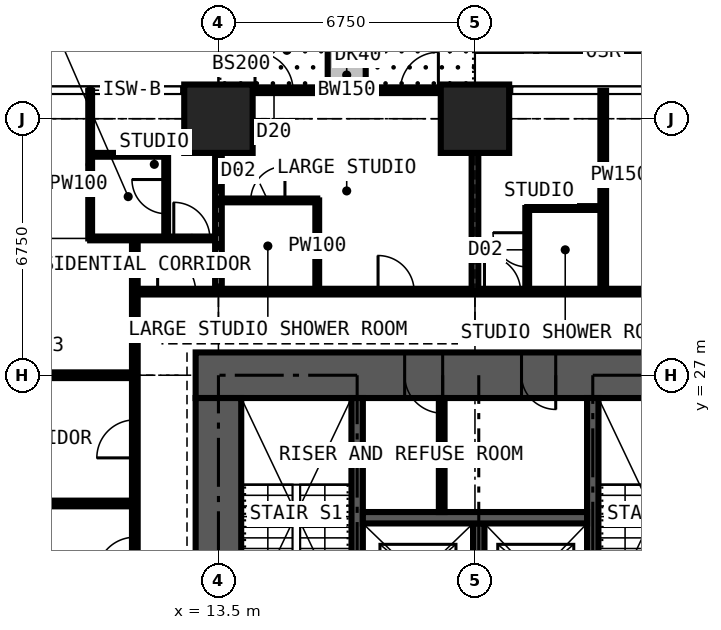
"""IFC4 building model, lengths in metres.
Left out: names, types, materials, properties, quantities, classifications, styles, units other than length and angle.
Written with IfcOpenShell. Run it as: python <this file> out.ifc"""

import sys

from ifc_helpers import new_model, si_unit, direction, frame, frame_2d, origin, origin_2d, place, context, subcontext, project, spatial, rectangle, extrude, element, fill, save


model = new_model("IFC4")
c1 = context("Model", 3, precision=1e-05, world=origin(), true_north=direction((0.0, 1.0)))
c2 = subcontext(c1, "Body", "Model", "MODEL_VIEW")
j1 = project(units=[si_unit("LENGTHUNIT", "METRE"), si_unit("PLANEANGLEUNIT", "RADIAN")], contexts=[c1])
p1 = place(None, origin())
s1 = spatial("IfcSite", under=j1, at=p1, CompositionType="ELEMENT")
p2 = place(p1, origin())
s2 = spatial("IfcBuilding", under=s1, at=p2, CompositionType="ELEMENT")
p3 = place(p2, frame((0.0, 0.0, 94.5)))
s3 = spatial("IfcBuildingStorey", under=s2, at=p3, CompositionType="ELEMENT", Elevation=94.5)
for number, where, z_axis, x_axis in (
    (1, (13.5, 33.75, 0.0), (0.0, 0.0, 1.0), (1.0, 0.0, 0.0)),
    (2, (20.25, 33.75, 0.0), (0.0, 0.0, 1.0), (1.0, 0.0, 0.0)),
):
    element("IfcColumn", number, at=place(p3, frame(where, z_axis=z_axis, x_axis=x_axis)), inside=s3, PredefinedType="COLUMN", context=c2, shape_type="SweptSolid", body=[
        extrude(rectangle(XDim=1.8, YDim=1.8, at=origin_2d()), origin(), (0.0, 0.0, 1.0), 3.6),
    ])
p4 = place(p3, frame((27.6, 27.0, 0.0), z_axis=(0.0, 0.0, 1.0), x_axis=(-1.0, 0.0, 0.0)))
e3 = element("IfcWall", 3, at=p4, inside=s3, PredefinedType="SHEAR", context=c2, shape_type="SweptSolid", body=[
    extrude(rectangle(XDim=14.7, YDim=1.2, at=frame_2d((7.35, 0.0))), origin(), (0.0, 0.0, 1.0), 3.6),
])
p5 = place(p4, frame((5.225, 0.0, 0.0)))
e4 = element("IfcOpeningElement", 4, at=p5, cuts=e3, PredefinedType="OPENING", context=c2, shape_type="SweptSolid", body=[
    extrude(rectangle(XDim=0.9, YDim=2.2, at=frame_2d((0.45, 1.1))), frame((0.0, 0.61, 0.0), z_axis=(0.0, -1.0, 0.0), x_axis=(1.0, 0.0, 0.0)), (0.0, 0.0, 1.0), 1.22),
])
p6 = place(p4, frame((8.2, 0.0, 0.0)))
e5 = element("IfcOpeningElement", 5, at=p6, cuts=e3, PredefinedType="OPENING", context=c2, shape_type="SweptSolid", body=[
    extrude(rectangle(XDim=1.0, YDim=2.2, at=frame_2d((0.5, 1.1))), frame((0.0, 0.61, 0.0), z_axis=(0.0, -1.0, 0.0), x_axis=(1.0, 0.0, 0.0)), (0.0, 0.0, 1.0), 1.22),
])
p7 = place(p3, frame((13.5, 26.4, 0.0), z_axis=(0.0, 0.0, 1.0), x_axis=(0.0, -1.0, 0.0)))
e6 = element("IfcWall", 6, at=p7, inside=s3, PredefinedType="SHEAR", context=c2, shape_type="SweptSolid", body=[
    extrude(rectangle(XDim=12.3, YDim=1.2, at=frame_2d((6.15, 0.0))), origin(), (0.0, 0.0, 1.0), 3.6),
])
p8 = place(p7, frame((7.45, 0.0, 0.0)))
e7 = element("IfcOpeningElement", 7, at=p8, cuts=e6, PredefinedType="OPENING", context=c2, shape_type="SweptSolid", body=[
    extrude(rectangle(XDim=1.2, YDim=2.2, at=frame_2d((0.6, 1.1))), frame((0.0, 0.61, 0.0), z_axis=(0.0, -1.0, 0.0), x_axis=(1.0, 0.0, 0.0)), (0.0, 0.0, 1.0), 1.22),
])
p9 = place(p3, frame((13.5, 34.5, 0.0), z_axis=(0.0, 0.0, 1.0), x_axis=(1.0, 0.0, 0.0)))
e8 = element("IfcWall", 8, at=p9, inside=s3, PredefinedType="SOLIDWALL", context=c2, shape_type="SweptSolid", body=[
    extrude(rectangle(XDim=6.75, YDim=0.15, at=frame_2d((3.375, 0.0))), origin(), (0.0, 0.0, 1.0), 3.375),
])
p10 = place(p9, frame((0.962, 0.0, 0.0)))
e9 = element("IfcOpeningElement", 9, at=p10, cuts=e8, PredefinedType="OPENING", context=c2, shape_type="SweptSolid", body=[
    extrude(rectangle(XDim=1.0, YDim=2.2, at=frame_2d((0.5, 1.1))), frame((0.0, 0.085, 0.0), z_axis=(0.0, -1.0, 0.0), x_axis=(1.0, 0.0, 0.0)), (0.0, 0.0, 1.0), 0.17),
])
p11 = place(p9, frame((2.025, 0.0, 0.9)))
e10 = element("IfcOpeningElement", 10, at=p11, cuts=e8, PredefinedType="OPENING", context=c2, shape_type="SweptSolid", body=[
    extrude(rectangle(XDim=1.2, YDim=1.8, at=frame_2d((0.6, 0.9))), frame((0.0, 0.085, 0.0), z_axis=(0.0, -1.0, 0.0), x_axis=(1.0, 0.0, 0.0)), (0.0, 0.0, 1.0), 0.17),
])
p12 = place(p9, frame((4.788, 0.0, 0.0)))
e11 = element("IfcOpeningElement", 11, at=p12, cuts=e8, PredefinedType="OPENING", context=c2, shape_type="SweptSolid", body=[
    extrude(rectangle(XDim=1.0, YDim=2.2, at=frame_2d((0.5, 1.1))), frame((0.0, 0.085, 0.0), z_axis=(0.0, -1.0, 0.0), x_axis=(1.0, 0.0, 0.0)), (0.0, 0.0, 1.0), 0.17),
])
p13 = place(p9, frame((3.525, 0.0, 0.9)))
e12 = element("IfcOpeningElement", 12, at=p13, cuts=e8, PredefinedType="OPENING", context=c2, shape_type="SweptSolid", body=[
    extrude(rectangle(XDim=1.2, YDim=1.8, at=frame_2d((0.6, 0.9))), frame((0.0, 0.085, 0.0), z_axis=(0.0, -1.0, 0.0), x_axis=(1.0, 0.0, 0.0)), (0.0, 0.0, 1.0), 0.17),
])
p14 = place(p3, frame((16.875, 34.6, 0.0), z_axis=(0.0, 0.0, 1.0), x_axis=(0.0, 1.0, 0.0)))
e13 = element("IfcWall", 13, at=p14, inside=s3, PredefinedType="USERDEFINED", context=c2, shape_type="SweptSolid", body=[
    extrude(rectangle(XDim=2.2, YDim=1.0, at=frame_2d((1.1, 0.0))), origin(), (0.0, 0.0, 1.0), 0.9),
])
for number, where, z_axis, x_axis in (
    (14, (17.15, 20.3, 0.0), (0.0, 0.0, 1.0), (0.0, 1.0, 0.0)),
    (15, (23.35, 20.3, 0.0), (0.0, 0.0, 1.0), (0.0, 1.0, 0.0)),
):
    element("IfcWall", number, at=place(p3, frame(where, z_axis=z_axis, x_axis=x_axis)), inside=s3, PredefinedType="SHEAR", context=c2, shape_type="SweptSolid", body=[
        extrude(rectangle(XDim=6.1, YDim=0.3, at=frame_2d((3.05, 0.0))), origin(), (0.0, 0.0, 1.0), 3.6),
    ])
p15 = place(p3, frame((20.35, 20.3, 0.0), z_axis=(0.0, 0.0, 1.0), x_axis=(0.0, 1.0, 0.0)))
e16 = element("IfcWall", 16, at=p15, inside=s3, PredefinedType="SHEAR", context=c2, shape_type="SweptSolid", body=[
    extrude(rectangle(XDim=2.8, YDim=0.3, at=frame_2d((1.4, 0.0))), origin(), (0.0, 0.0, 1.0), 3.6),
])
p16 = place(p3, frame((17.3, 23.25, 0.0), z_axis=(0.0, 0.0, 1.0), x_axis=(1.0, 0.0, 0.0)))
e17 = element("IfcWall", 17, at=p16, inside=s3, PredefinedType="SHEAR", context=c2, shape_type="SweptSolid", body=[
    extrude(rectangle(XDim=5.9, YDim=0.3, at=frame_2d((2.95, 0.0))), origin(), (0.0, 0.0, 1.0), 3.6),
])
p17 = place(p3, frame((19.375, 23.4, 0.0), z_axis=(0.0, 0.0, 1.0), x_axis=(0.0, 1.0, 0.0)))
e18 = element("IfcWall", 18, at=p17, inside=s3, PredefinedType="PARTITIONING", context=c2, shape_type="SweptSolid", body=[
    extrude(rectangle(XDim=3.0, YDim=0.15, at=frame_2d((1.5, 0.0))), origin(), (0.0, 0.0, 1.0), 3.375),
])
p18 = place(p3, frame((-0.734, 23.625, 0.0), z_axis=(0.0, 0.0, 1.0), x_axis=(1.0, 0.0, 0.0)))
e19 = element("IfcWall", 19, at=p18, inside=s3, PredefinedType="PARTITIONING", context=c2, shape_type="SweptSolid", body=[
    extrude(rectangle(XDim=12.034, YDim=0.15, at=frame_2d((6.017, 0.0))), origin(), (0.0, 0.0, 1.0), 3.375),
])
p19 = place(p3, frame((-0.734, 27.0, 0.0), z_axis=(0.0, 0.0, 1.0), x_axis=(1.0, 0.0, 0.0)))
e20 = element("IfcWall", 20, at=p19, inside=s3, PredefinedType="PARTITIONING", context=c2, shape_type="SweptSolid", body=[
    extrude(rectangle(XDim=12.034, YDim=0.15, at=frame_2d((6.017, 0.0))), origin(), (0.0, 0.0, 1.0), 2.806),
])
p20 = place(p19, frame((8.434, 0.0, 0.0)))
e21 = element("IfcOpeningElement", 21, at=p20, cuts=e20, PredefinedType="OPENING", context=c2, shape_type="SweptSolid", body=[
    extrude(rectangle(XDim=1.0, YDim=2.2, at=frame_2d((0.5, 1.1))), frame((0.0, 0.085, 0.0), z_axis=(0.0, -1.0, 0.0), x_axis=(1.0, 0.0, 0.0)), (0.0, 0.0, 1.0), 0.17),
])
p21 = place(p3, frame((10.125, 30.6, 0.0), z_axis=(0.0, 0.0, 1.0), x_axis=(0.0, 1.0, 0.0)))
e22 = element("IfcWall", 22, at=p21, inside=s3, PredefinedType="PARTITIONING", context=c2, shape_type="SweptSolid", body=[
    extrude(rectangle(XDim=3.884, YDim=0.1, at=frame_2d((1.942, 0.0))), origin(), (0.0, 0.0, 1.0), 3.375),
])
p22 = place(p3, frame((10.125, 30.6, 0.0), z_axis=(0.0, 0.0, 1.0), x_axis=(1.0, 0.0, 0.0)))
e23 = element("IfcWall", 23, at=p22, inside=s3, PredefinedType="PARTITIONING", context=c2, shape_type="SweptSolid", body=[
    extrude(rectangle(XDim=3.375, YDim=0.1, at=frame_2d((1.688, 0.0))), origin(), (0.0, 0.0, 1.0), 3.375),
])
p23 = place(p22, frame((2.2, 0.0, 0.0)))
e24 = element("IfcOpeningElement", 24, at=p23, cuts=e23, PredefinedType="OPENING", context=c2, shape_type="SweptSolid", body=[
    extrude(rectangle(XDim=0.95, YDim=2.2, at=frame_2d((0.475, 1.1))), frame((0.0, 0.06, 0.0), z_axis=(0.0, -1.0, 0.0), x_axis=(1.0, 0.0, 0.0)), (0.0, 0.0, 1.0), 0.12),
])
p24 = place(p3, frame((10.125, 32.8, 0.0), z_axis=(0.0, 0.0, 1.0), x_axis=(1.0, 0.0, 0.0)))
e25 = element("IfcWall", 25, at=p24, inside=s3, PredefinedType="PARTITIONING", context=c2, shape_type="SweptSolid", body=[
    extrude(rectangle(XDim=2.0, YDim=0.1, at=frame_2d((1.0, 0.0))), origin(), (0.0, 0.0, 1.0), 3.375),
])
p25 = place(p3, frame((11.3, 11.3, 0.0), z_axis=(0.0, 0.0, 1.0), x_axis=(0.0, 1.0, 0.0)))
e26 = element("IfcWall", 26, at=p25, inside=s3, PredefinedType="PARTITIONING", context=c2, shape_type="SweptSolid", body=[
    extrude(rectangle(XDim=19.3, YDim=0.15, at=frame_2d((9.65, 0.0))), origin(), (0.0, 0.0, 1.0), 3.375),
])
p26 = place(p25, frame((13.525, 0.0, 0.0)))
e27 = element("IfcOpeningElement", 27, at=p26, cuts=e26, PredefinedType="OPENING", context=c2, shape_type="SweptSolid", body=[
    extrude(rectangle(XDim=1.0, YDim=2.2, at=frame_2d((0.5, 1.1))), frame((0.0, 0.085, 0.0), z_axis=(0.0, -1.0, 0.0), x_axis=(1.0, 0.0, 0.0)), (0.0, 0.0, 1.0), 0.17),
])
p27 = place(p25, frame((10.438, 0.0, 0.0)))
e28 = element("IfcOpeningElement", 28, at=p27, cuts=e26, PredefinedType="OPENING", context=c2, shape_type="SweptSolid", body=[
    extrude(rectangle(XDim=1.0, YDim=2.2, at=frame_2d((0.5, 1.1))), frame((0.0, 0.085, 0.0), z_axis=(0.0, -1.0, 0.0), x_axis=(1.0, 0.0, 0.0)), (0.0, 0.0, 1.0), 0.17),
])
p28 = place(p3, frame((11.3, 29.2, 0.0), z_axis=(0.0, 0.0, 1.0), x_axis=(1.0, 0.0, 0.0)))
e29 = element("IfcWall", 29, at=p28, inside=s3, PredefinedType="PARTITIONING", context=c2, shape_type="SweptSolid", body=[
    extrude(rectangle(XDim=19.075, YDim=0.15, at=frame_2d((9.538, 0.0))), origin(), (0.0, 0.0, 1.0), 3.375),
])
p29 = place(p28, frame((6.4, 0.0, 0.0)))
e30 = element("IfcOpeningElement", 30, at=p29, cuts=e29, PredefinedType="OPENING", context=c2, shape_type="SweptSolid", body=[
    extrude(rectangle(XDim=0.95, YDim=2.2, at=frame_2d((0.475, 1.1))), frame((0.0, 0.085, 0.0), z_axis=(0.0, -1.0, 0.0), x_axis=(1.0, 0.0, 0.0)), (0.0, 0.0, 1.0), 0.17),
])
p30 = place(p28, frame((9.2, 0.0, 0.0)))
e31 = element("IfcOpeningElement", 31, at=p30, cuts=e29, PredefinedType="OPENING", context=c2, shape_type="SweptSolid", body=[
    extrude(rectangle(XDim=0.95, YDim=2.2, at=frame_2d((0.475, 1.1))), frame((0.0, 0.085, 0.0), z_axis=(0.0, -1.0, 0.0), x_axis=(1.0, 0.0, 0.0)), (0.0, 0.0, 1.0), 0.17),
])
p31 = place(p28, frame((0.6, 0.0, 0.0)))
e32 = element("IfcOpeningElement", 32, at=p31, cuts=e29, PredefinedType="OPENING", context=c2, shape_type="SweptSolid", body=[
    extrude(rectangle(XDim=1.0, YDim=2.2, at=frame_2d((0.5, 1.1))), frame((0.0, 0.085, 0.0), z_axis=(0.0, -1.0, 0.0), x_axis=(1.0, 0.0, 0.0)), (0.0, 0.0, 1.0), 0.17),
])
p32 = place(p3, frame((12.125, 30.6, 0.0), z_axis=(0.0, 0.0, 1.0), x_axis=(0.0, 1.0, 0.0)))
e33 = element("IfcWall", 33, at=p32, inside=s3, PredefinedType="PARTITIONING", context=c2, shape_type="SweptSolid", body=[
    extrude(rectangle(XDim=2.2, YDim=0.1, at=frame_2d((1.1, 0.0))), origin(), (0.0, 0.0, 1.0), 3.375),
])
p33 = place(p32, frame((0.65, 0.0, 0.0)))
e34 = element("IfcOpeningElement", 34, at=p33, cuts=e33, PredefinedType="OPENING", context=c2, shape_type="SweptSolid", body=[
    extrude(rectangle(XDim=0.9, YDim=2.2, at=frame_2d((0.45, 1.1))), frame((0.0, 0.06, 0.0), z_axis=(0.0, -1.0, 0.0), x_axis=(1.0, 0.0, 0.0)), (0.0, 0.0, 1.0), 0.12),
])
p34 = place(p3, frame((13.5, 29.2, 0.0), z_axis=(0.0, 0.0, 1.0), x_axis=(0.0, 1.0, 0.0)))
e35 = element("IfcWall", 35, at=p34, inside=s3, PredefinedType="PARTITIONING", context=c2, shape_type="SweptSolid", body=[
    extrude(rectangle(XDim=5.284, YDim=0.175, at=frame_2d((2.642, 0.0))), origin(), (0.0, 0.0, 1.0), 2.806),
])
p35 = place(p3, frame((13.5, 31.6, 0.0), z_axis=(0.0, 0.0, 1.0), x_axis=(1.0, 0.0, 0.0)))
e36 = element("IfcWall", 36, at=p35, inside=s3, PredefinedType="PARTITIONING", context=c2, shape_type="SweptSolid", body=[
    extrude(rectangle(XDim=2.6, YDim=0.1, at=frame_2d((1.3, 0.0))), origin(), (0.0, 0.0, 1.0), 3.375),
])
p36 = place(p35, frame((0.85, 0.0, 0.0)))
e37 = element("IfcOpeningElement", 37, at=p36, cuts=e36, PredefinedType="OPENING", context=c2, shape_type="SweptSolid", body=[
    extrude(rectangle(XDim=0.9, YDim=2.2, at=frame_2d((0.45, 1.1))), frame((0.0, 0.06, 0.0), z_axis=(0.0, -1.0, 0.0), x_axis=(1.0, 0.0, 0.0)), (0.0, 0.0, 1.0), 0.12),
])
p37 = place(p3, frame((16.1, 29.2, 0.0), z_axis=(0.0, 0.0, 1.0), x_axis=(0.0, 1.0, 0.0)))
e38 = element("IfcWall", 38, at=p37, inside=s3, PredefinedType="PARTITIONING", context=c2, shape_type="SweptSolid", body=[
    extrude(rectangle(XDim=2.4, YDim=0.1, at=frame_2d((1.2, 0.0))), origin(), (0.0, 0.0, 1.0), 3.375),
])
p38 = place(p3, frame((20.25, 29.2, 0.0), z_axis=(0.0, 0.0, 1.0), x_axis=(0.0, 1.0, 0.0)))
e39 = element("IfcWall", 39, at=p38, inside=s3, PredefinedType="PARTITIONING", context=c2, shape_type="SweptSolid", body=[
    extrude(rectangle(XDim=5.284, YDim=0.175, at=frame_2d((2.642, 0.0))), origin(), (0.0, 0.0, 1.0), 2.61),
])
p39 = place(p3, frame((21.625, 29.2, 0.0), z_axis=(0.0, 0.0, 1.0), x_axis=(0.0, 1.0, 0.0)))
e40 = element("IfcWall", 40, at=p39, inside=s3, PredefinedType="PARTITIONING", context=c2, shape_type="SweptSolid", body=[
    extrude(rectangle(XDim=2.2, YDim=0.1, at=frame_2d((1.1, 0.0))), origin(), (0.0, 0.0, 1.0), 3.375),
])
p40 = place(p39, frame((0.65, 0.0, 0.0)))
e41 = element("IfcOpeningElement", 41, at=p40, cuts=e40, PredefinedType="OPENING", context=c2, shape_type="SweptSolid", body=[
    extrude(rectangle(XDim=0.9, YDim=2.2, at=frame_2d((0.45, 1.1))), frame((0.0, 0.06, 0.0), z_axis=(0.0, -1.0, 0.0), x_axis=(1.0, 0.0, 0.0)), (0.0, 0.0, 1.0), 0.12),
])
p41 = place(p3, frame((21.625, 31.4, 0.0), z_axis=(0.0, 0.0, 1.0), x_axis=(1.0, 0.0, 0.0)))
e42 = element("IfcWall", 42, at=p41, inside=s3, PredefinedType="PARTITIONING", context=c2, shape_type="SweptSolid", body=[
    extrude(rectangle(XDim=2.0, YDim=0.1, at=frame_2d((1.0, 0.0))), origin(), (0.0, 0.0, 1.0), 3.375),
])
p42 = place(p3, frame((23.625, 29.2, 0.0), z_axis=(0.0, 0.0, 1.0), x_axis=(0.0, 1.0, 0.0)))
e43 = element("IfcWall", 43, at=p42, inside=s3, PredefinedType="PARTITIONING", context=c2, shape_type="SweptSolid", body=[
    extrude(rectangle(XDim=5.284, YDim=0.15, at=frame_2d((2.642, 0.0))), origin(), (0.0, 0.0, 1.0), 3.375),
])
p43 = place(p10, origin())
e44 = element("IfcDoor", 44, at=p43, inside=s3, OperationType="SINGLE_SWING_LEFT", PredefinedType="DOOR", context=c2, shape_type="SweptSolid", body=[
    extrude(rectangle(XDim=1.0, YDim=2.2, at=frame_2d((0.5, 1.1))), frame((0.0, 0.025, 0.0), z_axis=(0.0, -1.0, 0.0), x_axis=(1.0, 0.0, 0.0)), (0.0, 0.0, 1.0), 0.05),
])
fill(e9, e44)
p44 = place(p11, origin())
e45 = element("IfcWindow", 45, at=p44, inside=s3, PartitioningType="SINGLE_PANEL", PredefinedType="WINDOW", context=c2, shape_type="SweptSolid", body=[
    extrude(rectangle(XDim=1.2, YDim=1.8, at=frame_2d((0.6, 0.9))), frame((0.0, 0.03, 0.0), z_axis=(0.0, -1.0, 0.0), x_axis=(1.0, 0.0, 0.0)), (0.0, 0.0, 1.0), 0.06),
])
fill(e10, e45)
p45 = place(p12, origin())
e46 = element("IfcDoor", 46, at=p45, inside=s3, OperationType="SINGLE_SWING_RIGHT", PredefinedType="DOOR", context=c2, shape_type="SweptSolid", body=[
    extrude(rectangle(XDim=1.0, YDim=2.2, at=frame_2d((0.5, 1.1))), frame((0.0, 0.025, 0.0), z_axis=(0.0, -1.0, 0.0), x_axis=(1.0, 0.0, 0.0)), (0.0, 0.0, 1.0), 0.05),
])
fill(e11, e46)
p46 = place(p13, origin())
e47 = element("IfcWindow", 47, at=p46, inside=s3, PartitioningType="SINGLE_PANEL", PredefinedType="WINDOW", context=c2, shape_type="SweptSolid", body=[
    extrude(rectangle(XDim=1.2, YDim=1.8, at=frame_2d((0.6, 0.9))), frame((0.0, 0.03, 0.0), z_axis=(0.0, -1.0, 0.0), x_axis=(1.0, 0.0, 0.0)), (0.0, 0.0, 1.0), 0.06),
])
fill(e12, e47)
p47 = place(p5, origin())
e48 = element("IfcDoor", 48, at=p47, inside=s3, OperationType="SINGLE_SWING_LEFT", PredefinedType="DOOR", context=c2, shape_type="SweptSolid", body=[
    extrude(rectangle(XDim=0.9, YDim=2.2, at=frame_2d((0.45, 1.1))), frame((0.0, 0.4, 0.0), z_axis=(0.0, -1.0, 0.0), x_axis=(1.0, 0.0, 0.0)), (0.0, 0.0, 1.0), 0.8),
])
fill(e4, e48)
p48 = place(p6, origin())
e49 = element("IfcDoor", 49, at=p48, inside=s3, OperationType="SINGLE_SWING_LEFT", PredefinedType="DOOR", context=c2, shape_type="SweptSolid", body=[
    extrude(rectangle(XDim=1.0, YDim=2.2, at=frame_2d((0.5, 1.1))), frame((0.0, 0.025, 0.0), z_axis=(0.0, -1.0, 0.0), x_axis=(1.0, 0.0, 0.0)), (0.0, 0.0, 1.0), 0.05),
])
fill(e5, e49)
p49 = place(p29, origin())
e50 = element("IfcDoor", 50, at=p49, inside=s3, OperationType="SINGLE_SWING_LEFT", PredefinedType="DOOR", context=c2, shape_type="SweptSolid", body=[
    extrude(rectangle(XDim=0.95, YDim=2.2, at=frame_2d((0.475, 1.1))), frame((0.0, 0.025, 0.0), z_axis=(0.0, -1.0, 0.0), x_axis=(1.0, 0.0, 0.0)), (0.0, 0.0, 1.0), 0.05),
])
fill(e30, e50)
p50 = place(p36, origin())
e51 = element("IfcDoor", 51, at=p50, inside=s3, OperationType="SINGLE_SWING_RIGHT", PredefinedType="DOOR", context=c2, shape_type="SweptSolid", body=[
    extrude(rectangle(XDim=0.9, YDim=2.2, at=frame_2d((0.45, 1.1))), frame((0.0, 0.025, 0.0), z_axis=(0.0, -1.0, 0.0), x_axis=(1.0, 0.0, 0.0)), (0.0, 0.0, 1.0), 0.05),
])
fill(e37, e51)
p51 = place(p23, origin())
e52 = element("IfcDoor", 52, at=p51, inside=s3, OperationType="SINGLE_SWING_LEFT", PredefinedType="DOOR", context=c2, shape_type="SweptSolid", body=[
    extrude(rectangle(XDim=0.95, YDim=2.2, at=frame_2d((0.475, 1.1))), frame((0.0, 0.025, 0.0), z_axis=(0.0, -1.0, 0.0), x_axis=(1.0, 0.0, 0.0)), (0.0, 0.0, 1.0), 0.05),
])
fill(e24, e52)
p52 = place(p33, origin())
e53 = element("IfcDoor", 53, at=p52, inside=s3, OperationType="SINGLE_SWING_RIGHT", PredefinedType="DOOR", context=c2, shape_type="SweptSolid", body=[
    extrude(rectangle(XDim=0.9, YDim=2.2, at=frame_2d((0.45, 1.1))), frame((0.0, 0.025, 0.0), z_axis=(0.0, -1.0, 0.0), x_axis=(1.0, 0.0, 0.0)), (0.0, 0.0, 1.0), 0.05),
])
fill(e34, e53)
p53 = place(p30, origin())
e54 = element("IfcDoor", 54, at=p53, inside=s3, OperationType="SINGLE_SWING_LEFT", PredefinedType="DOOR", context=c2, shape_type="SweptSolid", body=[
    extrude(rectangle(XDim=0.95, YDim=2.2, at=frame_2d((0.475, 1.1))), frame((0.0, 0.025, 0.0), z_axis=(0.0, -1.0, 0.0), x_axis=(1.0, 0.0, 0.0)), (0.0, 0.0, 1.0), 0.05),
])
fill(e31, e54)
p54 = place(p40, origin())
e55 = element("IfcDoor", 55, at=p54, inside=s3, OperationType="SINGLE_SWING_RIGHT", PredefinedType="DOOR", context=c2, shape_type="SweptSolid", body=[
    extrude(rectangle(XDim=0.9, YDim=2.2, at=frame_2d((0.45, 1.1))), frame((0.0, 0.025, 0.0), z_axis=(0.0, -1.0, 0.0), x_axis=(1.0, 0.0, 0.0)), (0.0, 0.0, 1.0), 0.05),
])
fill(e41, e55)
p55 = place(p31, origin())
e56 = element("IfcDoor", 56, at=p55, inside=s3, OperationType="SINGLE_SWING_LEFT", PredefinedType="DOOR", context=c2, shape_type="SweptSolid", body=[
    extrude(rectangle(XDim=1.0, YDim=2.2, at=frame_2d((0.5, 1.1))), frame((0.0, 0.025, 0.0), z_axis=(0.0, -1.0, 0.0), x_axis=(1.0, 0.0, 0.0)), (0.0, 0.0, 1.0), 0.05),
])
fill(e32, e56)
p56 = place(p26, origin())
e57 = element("IfcDoor", 57, at=p56, inside=s3, OperationType="SINGLE_SWING_LEFT", PredefinedType="DOOR", context=c2, shape_type="SweptSolid", body=[
    extrude(rectangle(XDim=1.0, YDim=2.2, at=frame_2d((0.5, 1.1))), frame((0.0, 0.025, 0.0), z_axis=(0.0, -1.0, 0.0), x_axis=(1.0, 0.0, 0.0)), (0.0, 0.0, 1.0), 0.05),
])
fill(e27, e57)
p57 = place(p27, origin())
e58 = element("IfcDoor", 58, at=p57, inside=s3, OperationType="SINGLE_SWING_LEFT", PredefinedType="DOOR", context=c2, shape_type="SweptSolid", body=[
    extrude(rectangle(XDim=1.0, YDim=2.2, at=frame_2d((0.5, 1.1))), frame((0.0, 0.025, 0.0), z_axis=(0.0, -1.0, 0.0), x_axis=(1.0, 0.0, 0.0)), (0.0, 0.0, 1.0), 0.05),
])
fill(e28, e58)
save(model, sys.argv[1])
